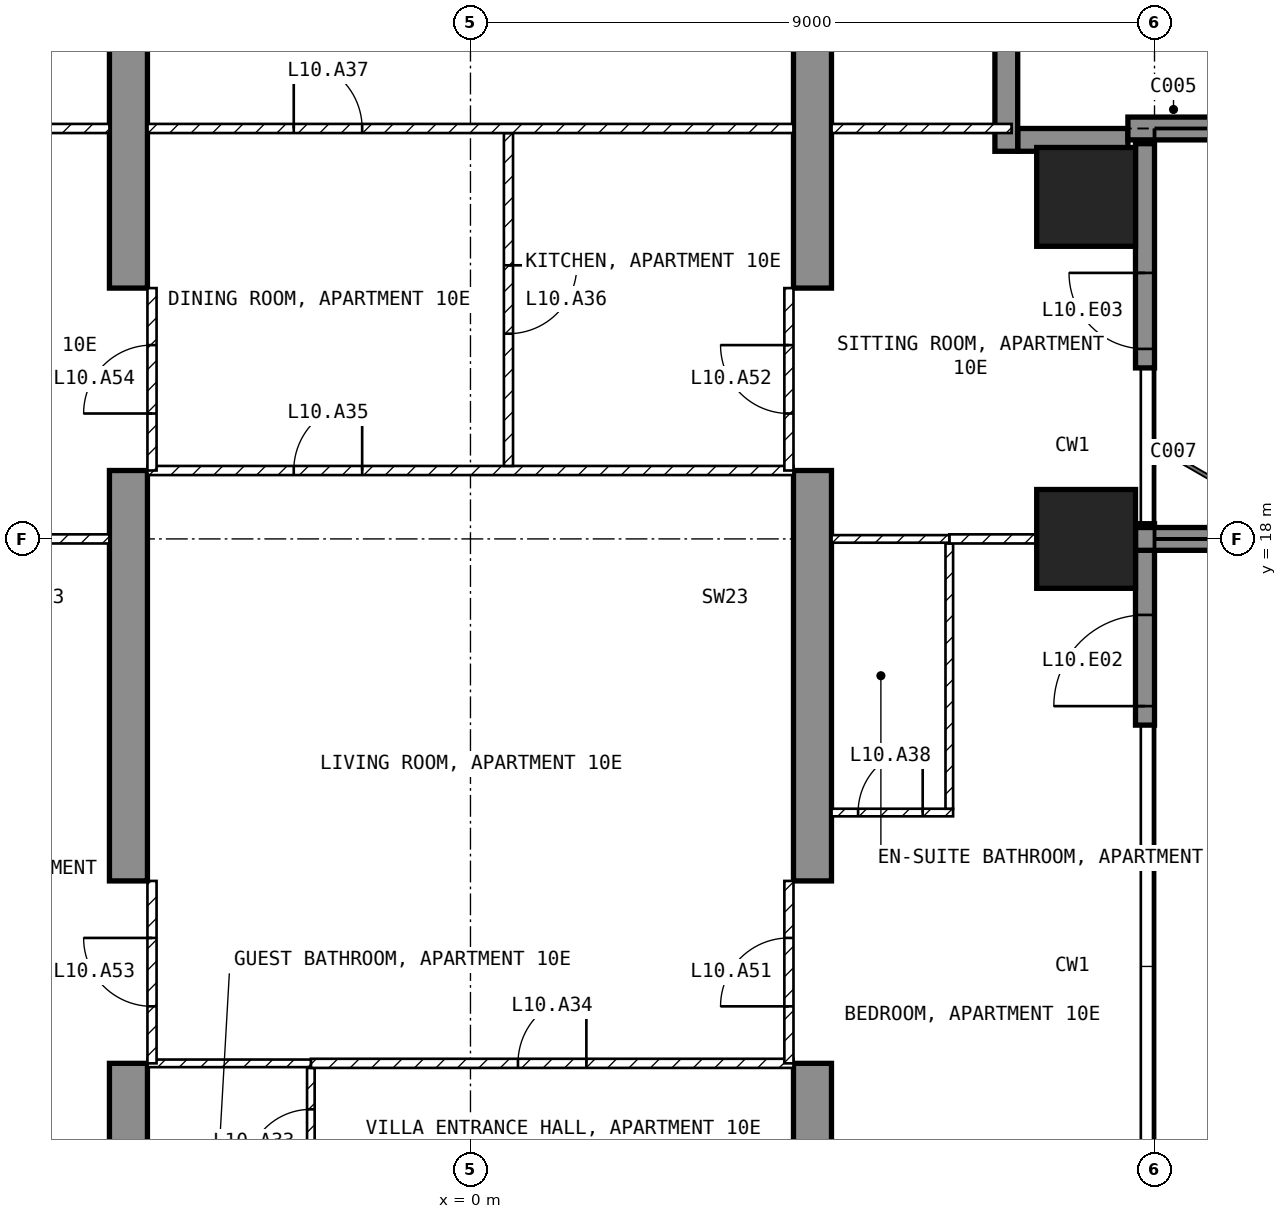
"""IFC4 building model, lengths in metres.
Left out: names, types, materials, properties, quantities, classifications, styles, units other than length and angle.
Written with IfcOpenShell. Run it as: python <this file> out.ifc"""

import sys

from ifc_helpers import new_model, si_unit, direction, frame, frame_2d, origin, origin_2d, place, context, subcontext, project, spatial, polyline, rectangle, outline, extrude, element, fill, save


model = new_model("IFC4")
c1 = context("Model", 3, precision=1e-05, world=origin(), true_north=direction((0.0, 1.0)))
c2 = subcontext(c1, "Body", "Model", "MODEL_VIEW")
j1 = project(units=[si_unit("LENGTHUNIT", "METRE"), si_unit("PLANEANGLEUNIT", "RADIAN")], contexts=[c1])
p1 = place(None, origin())
s1 = spatial("IfcSite", under=j1, at=p1, CompositionType="ELEMENT")
p2 = place(p1, origin())
s2 = spatial("IfcBuilding", under=s1, at=p2, CompositionType="ELEMENT")
p3 = place(p2, frame((0.0, 0.0, 54.0)))
s3 = spatial("IfcBuildingStorey", under=s2, at=p3, CompositionType="ELEMENT", Elevation=54.0)
for number, where, z_axis, x_axis in (
    (1, (8.1, 18.0, -0.25), (0.0, 0.0, 1.0), (1.0, 0.0, 0.0)),
    (2, (8.1, 22.5, -0.25), (0.0, 0.0, 1.0), (1.0, 0.0, 0.0)),
):
    element("IfcColumn", number, at=place(p3, frame(where, z_axis=z_axis, x_axis=x_axis)), inside=s3, PredefinedType="COLUMN", context=c2, shape_type="SweptSolid", body=[
        extrude(rectangle(XDim=1.3, YDim=1.3, at=origin_2d()), origin(), (0.0, 0.0, 1.0), 3.5),
    ])
for number, where, z_axis, x_axis in (
    (3, (-4.75, 9.0, -0.25), (1.0, 0.0, 0.0), (0.0, 1.0, 0.0)),
    (4, (4.25, 9.0, -0.25), (1.0, 0.0, 0.0), (0.0, 1.0, 0.0)),
):
    element("IfcWall", number, at=place(p3, frame(where, z_axis=z_axis, x_axis=x_axis)), inside=s3, PredefinedType="SHEAR", context=c2, shape_type="SweptSolid", body=[
        extrude(outline(polyline([(0.0, 0.0), (2.1, 0.0), (2.1, 2.65), (4.5, 2.65), (4.5, 0.0), (9.9, 0.0), (9.9, 2.65), (12.3, 2.65), (12.3, 0.0), (16.45, 0.0), (16.45, 3.5), (0.0, 3.5), (0.0, 0.0)])), origin(), (0.0, 0.0, 1.0), 0.5),
    ])
p4 = place(p3, frame((8.875, 15.55, 0.0), z_axis=(0.0, 0.0, 1.0), x_axis=(0.0, 1.0, 0.0)))
e5 = element("IfcWall", 5, at=p4, inside=s3, PredefinedType="SOLIDWALL", context=c2, shape_type="SweptSolid", body=[
    extrude(rectangle(XDim=2.65, YDim=0.25, at=frame_2d((1.325, 0.0))), origin(), (0.0, 0.0, 1.0), 3.25),
])
p5 = place(p4, frame((0.25, 0.0, 0.0)))
e6 = element("IfcOpeningElement", 6, at=p5, cuts=e5, PredefinedType="OPENING", context=c2, shape_type="SweptSolid", body=[
    extrude(rectangle(XDim=1.2, YDim=2.4, at=frame_2d((0.6, 1.2))), frame((0.0, 0.135, 0.0), z_axis=(0.0, -1.0, 0.0), x_axis=(1.0, 0.0, 0.0)), (0.0, 0.0, 1.0), 0.27),
])
p6 = place(p3, frame((8.875, 20.25, 0.0), z_axis=(0.0, 0.0, 1.0), x_axis=(0.0, 1.0, 0.0)))
e7 = element("IfcWall", 7, at=p6, inside=s3, PredefinedType="SOLIDWALL", context=c2, shape_type="SweptSolid", body=[
    extrude(rectangle(XDim=2.95, YDim=0.25, at=frame_2d((1.475, 0.0))), origin(), (0.0, 0.0, 1.0), 3.25),
])
p7 = place(p6, frame((0.25, 0.0, 0.0)))
e8 = element("IfcOpeningElement", 8, at=p7, cuts=e7, PredefinedType="OPENING", context=c2, shape_type="SweptSolid", body=[
    extrude(rectangle(XDim=1.0, YDim=2.4, at=frame_2d((0.5, 1.2))), frame((0.0, 0.135, 0.0), z_axis=(0.0, -1.0, 0.0), x_axis=(1.0, 0.0, 0.0)), (0.0, 0.0, 1.0), 0.27),
])
p8 = place(p3, frame((8.65, 23.25, 0.0), z_axis=(0.0, 0.0, 1.0), x_axis=(-1.0, 0.0, 0.0)))
e9 = element("IfcWall", 9, at=p8, inside=s3, PredefinedType="SOLIDWALL", context=c2, shape_type="SweptSolid", body=[
    extrude(rectangle(XDim=1.45, YDim=0.3, at=frame_2d((0.725, 0.0))), origin(), (0.0, 0.0, 1.0), 3.25),
])
p9 = place(p3, frame((7.05, 23.1, 0.0), z_axis=(0.0, 0.0, 1.0), x_axis=(0.0, 1.0, 0.0)))
e10 = element("IfcWall", 10, at=p9, inside=s3, PredefinedType="SOLIDWALL", context=c2, shape_type="SweptSolid", body=[
    extrude(rectangle(XDim=1.8, YDim=0.3, at=frame_2d((0.9, 0.0))), origin(), (0.0, 0.0, 1.0), 3.25),
])
p10 = place(p3, frame((8.75, 18.0, 0.0), z_axis=(0.0, 0.0, 1.0), x_axis=(1.0, 0.0, 0.0)))
e11 = element("IfcWall", 11, at=p10, inside=s3, PredefinedType="SOLIDWALL", context=c2, shape_type="SweptSolid", body=[
    extrude(rectangle(XDim=2.95, YDim=0.3, at=frame_2d((1.475, 0.0))), origin(), (0.0, 0.0, 1.0), 3.25),
])
p11 = place(p3, frame((8.65, 23.4, 0.0), z_axis=(0.0, 0.0, 1.0), x_axis=(1.0, 0.0, 0.0)))
e12 = element("IfcWall", 12, at=p11, inside=s3, PredefinedType="SOLIDWALL", context=c2, shape_type="SweptSolid", body=[
    extrude(rectangle(XDim=3.05, YDim=0.3, at=frame_2d((1.525, 0.0))), origin(), (0.0, 0.0, 1.0), 3.25),
])
p12 = place(p3, frame((-2.1, 9.1, 0.0), z_axis=(0.0, 0.0, 1.0), x_axis=(0.0, 1.0, 0.0)))
e13 = element("IfcWall", 13, at=p12, inside=s3, PredefinedType="PARTITIONING", context=c2, shape_type="SweptSolid", body=[
    extrude(rectangle(XDim=1.94, YDim=0.1, at=frame_2d((0.97, 0.0))), origin(), (0.0, 0.0, 1.0), 3.25),
])
p13 = place(p12, frame((0.545, 0.0, 0.0)))
e14 = element("IfcOpeningElement", 14, at=p13, cuts=e13, PredefinedType="OPENING", context=c2, shape_type="SweptSolid", body=[
    extrude(rectangle(XDim=0.85, YDim=2.1, at=frame_2d((0.425, 1.05))), frame((0.0, 0.06, 0.0), z_axis=(0.0, -1.0, 0.0), x_axis=(1.0, 0.0, 0.0)), (0.0, 0.0, 1.0), 0.12),
])
p14 = place(p3, frame((-2.1, 11.1, 0.0), z_axis=(0.0, 0.0, 1.0), x_axis=(1.0, 0.0, 0.0)))
e15 = element("IfcWall", 15, at=p14, inside=s3, PredefinedType="PARTITIONING", context=c2, shape_type="SweptSolid", body=[
    extrude(rectangle(XDim=6.35, YDim=0.12, at=frame_2d((3.175, 0.0))), origin(), (0.0, 0.0, 1.0), 3.25),
])
p15 = place(p14, frame((2.725, 0.0, 0.0)))
e16 = element("IfcOpeningElement", 16, at=p15, cuts=e15, PredefinedType="OPENING", context=c2, shape_type="SweptSolid", body=[
    extrude(rectangle(XDim=0.9, YDim=2.1, at=frame_2d((0.45, 1.05))), frame((0.0, 0.07, 0.0), z_axis=(0.0, -1.0, 0.0), x_axis=(1.0, 0.0, 0.0)), (0.0, 0.0, 1.0), 0.14),
])
p16 = place(p3, frame((-4.25, 11.1, 0.0), z_axis=(0.0, 0.0, 1.0), x_axis=(1.0, 0.0, 0.0)))
e17 = element("IfcWall", 17, at=p16, inside=s3, PredefinedType="PARTITIONING", context=c2, shape_type="SweptSolid", body=[
    extrude(rectangle(XDim=2.15, YDim=0.1, at=frame_2d((1.075, 0.0))), origin(), (0.0, 0.0, 1.0), 3.25),
])
p17 = place(p3, frame((-4.25, 18.9, 0.0), z_axis=(0.0, 0.0, 1.0), x_axis=(1.0, 0.0, 0.0)))
e18 = element("IfcWall", 18, at=p17, inside=s3, PredefinedType="PARTITIONING", context=c2, shape_type="SweptSolid", body=[
    extrude(rectangle(XDim=8.5, YDim=0.12, at=frame_2d((4.25, 0.0))), origin(), (0.0, 0.0, 1.0), 3.25),
])
p18 = place(p17, frame((1.925, 0.0, 0.0)))
e19 = element("IfcOpeningElement", 19, at=p18, cuts=e18, PredefinedType="OPENING", context=c2, shape_type="SweptSolid", body=[
    extrude(rectangle(XDim=0.9, YDim=2.1, at=frame_2d((0.45, 1.05))), frame((0.0, 0.07, 0.0), z_axis=(0.0, -1.0, 0.0), x_axis=(1.0, 0.0, 0.0)), (0.0, 0.0, 1.0), 0.14),
])
p19 = place(p3, frame((0.5, 23.34, 0.0), z_axis=(0.0, 0.0, 1.0), x_axis=(0.0, -1.0, 0.0)))
e20 = element("IfcWall", 20, at=p19, inside=s3, PredefinedType="PARTITIONING", context=c2, shape_type="SweptSolid", body=[
    extrude(rectangle(XDim=4.38, YDim=0.12, at=frame_2d((2.19, 0.0))), origin(), (0.0, 0.0, 1.0), 3.25),
])
p20 = place(p19, frame((1.74, 0.0, 0.0)))
e21 = element("IfcOpeningElement", 21, at=p20, cuts=e20, PredefinedType="OPENING", context=c2, shape_type="SweptSolid", body=[
    extrude(rectangle(XDim=0.9, YDim=2.1, at=frame_2d((0.45, 1.05))), frame((0.0, 0.07, 0.0), z_axis=(0.0, -1.0, 0.0), x_axis=(1.0, 0.0, 0.0)), (0.0, 0.0, 1.0), 0.14),
])
p21 = place(p3, frame((-4.25, 23.4, 0.0), z_axis=(0.0, 0.0, 1.0), x_axis=(1.0, 0.0, 0.0)))
e22 = element("IfcWall", 22, at=p21, inside=s3, PredefinedType="PARTITIONING", context=c2, shape_type="SweptSolid", body=[
    extrude(rectangle(XDim=8.5, YDim=0.12, at=frame_2d((4.25, 0.0))), origin(), (0.0, 0.0, 1.0), 3.25),
])
p22 = place(p21, frame((1.925, 0.0, 0.0)))
e23 = element("IfcOpeningElement", 23, at=p22, cuts=e22, PredefinedType="OPENING", context=c2, shape_type="SweptSolid", body=[
    extrude(rectangle(XDim=0.9, YDim=2.1, at=frame_2d((0.45, 1.05))), frame((0.0, 0.07, 0.0), z_axis=(0.0, -1.0, 0.0), x_axis=(1.0, 0.0, 0.0)), (0.0, 0.0, 1.0), 0.14),
])
p23 = place(p3, frame((4.75, 14.4, 0.0), z_axis=(0.0, 0.0, 1.0), x_axis=(1.0, 0.0, 0.0)))
e24 = element("IfcWall", 24, at=p23, inside=s3, PredefinedType="PARTITIONING", context=c2, shape_type="SweptSolid", body=[
    extrude(rectangle(XDim=1.6, YDim=0.1, at=frame_2d((0.8, 0.0))), origin(), (0.0, 0.0, 1.0), 3.25),
])
p24 = place(p23, frame((0.35, 0.0, 0.0)))
e25 = element("IfcOpeningElement", 25, at=p24, cuts=e24, PredefinedType="OPENING", context=c2, shape_type="SweptSolid", body=[
    extrude(rectangle(XDim=0.85, YDim=2.1, at=frame_2d((0.425, 1.05))), frame((0.0, 0.06, 0.0), z_axis=(0.0, -1.0, 0.0), x_axis=(1.0, 0.0, 0.0)), (0.0, 0.0, 1.0), 0.12),
])
p25 = place(p3, frame((6.3, 14.45, 0.0), z_axis=(0.0, 0.0, 1.0), x_axis=(0.0, 1.0, 0.0)))
e26 = element("IfcWall", 26, at=p25, inside=s3, PredefinedType="PARTITIONING", context=c2, shape_type="SweptSolid", body=[
    extrude(rectangle(XDim=3.49, YDim=0.1, at=frame_2d((1.745, 0.0))), origin(), (0.0, 0.0, 1.0), 3.25),
])
p26 = place(p3, frame((6.3, 18.0, 0.0), z_axis=(0.0, 0.0, 1.0), x_axis=(1.0, 0.0, 0.0)))
e27 = element("IfcWall", 27, at=p26, inside=s3, PredefinedType="PARTITIONING", context=c2, shape_type="SweptSolid", body=[
    extrude(rectangle(XDim=1.15, YDim=0.12, at=frame_2d((0.575, 0.0))), origin(), (0.0, 0.0, 1.0), 2.346),
])
p27 = place(p3, frame((4.75, 18.0, 0.0), z_axis=(0.0, 0.0, 1.0), x_axis=(1.0, 0.0, 0.0)))
e28 = element("IfcWall", 28, at=p27, inside=s3, PredefinedType="PARTITIONING", context=c2, shape_type="SweptSolid", body=[
    extrude(rectangle(XDim=1.55, YDim=0.1, at=frame_2d((0.775, 0.0))), origin(), (0.0, 0.0, 1.0), 2.346),
])
p28 = place(p3, frame((4.75, 23.4, 0.0), z_axis=(0.0, 0.0, 1.0), x_axis=(1.0, 0.0, 0.0)))
e29 = element("IfcWall", 29, at=p28, inside=s3, PredefinedType="PARTITIONING", context=c2, shape_type="SweptSolid", body=[
    extrude(rectangle(XDim=2.37, YDim=0.12, at=frame_2d((1.185, 0.0))), origin(), (0.0, 0.0, 1.0), 3.25),
])
p29 = place(p3, frame((-7.45, 18.0, 0.0), z_axis=(0.0, 0.0, 1.0), x_axis=(1.0, 0.0, 0.0)))
e30 = element("IfcWall", 30, at=p29, inside=s3, PredefinedType="PARTITIONING", context=c2, shape_type="SweptSolid", body=[
    extrude(rectangle(XDim=2.7, YDim=0.12, at=frame_2d((1.35, 0.0))), origin(), (0.0, 0.0, 1.0), 2.346),
])
p30 = place(p3, frame((-7.12, 23.4, 0.0), z_axis=(0.0, 0.0, 1.0), x_axis=(1.0, 0.0, 0.0)))
e31 = element("IfcWall", 31, at=p30, inside=s3, PredefinedType="PARTITIONING", context=c2, shape_type="SweptSolid", body=[
    extrude(rectangle(XDim=2.37, YDim=0.12, at=frame_2d((1.185, 0.0))), origin(), (0.0, 0.0, 1.0), 3.25),
])
p31 = place(p3, frame((4.19, 11.1, 0.0), z_axis=(0.0, 0.0, 1.0), x_axis=(0.0, 1.0, 0.0)))
e32 = element("IfcWall", 32, at=p31, inside=s3, PredefinedType="PARTITIONING", context=c2, shape_type="SweptSolid", body=[
    extrude(rectangle(XDim=2.4, YDim=0.12, at=frame_2d((1.2, 0.0))), origin(), (0.0, 0.0, 1.0), 2.4),
])
p32 = place(p31, frame((0.75, 0.0, 0.0)))
e33 = element("IfcOpeningElement", 33, at=p32, cuts=e32, PredefinedType="OPENING", context=c2, shape_type="SweptSolid", body=[
    extrude(rectangle(XDim=0.9, YDim=2.1, at=frame_2d((0.45, 1.05))), frame((0.0, 0.07, 0.0), z_axis=(0.0, -1.0, 0.0), x_axis=(1.0, 0.0, 0.0)), (0.0, 0.0, 1.0), 0.14),
])
p33 = place(p3, frame((4.19, 18.9, 0.0), z_axis=(0.0, 0.0, 1.0), x_axis=(0.0, 1.0, 0.0)))
e34 = element("IfcWall", 34, at=p33, inside=s3, PredefinedType="PARTITIONING", context=c2, shape_type="SweptSolid", body=[
    extrude(rectangle(XDim=2.4, YDim=0.12, at=frame_2d((1.2, 0.0))), origin(), (0.0, 0.0, 1.0), 2.4),
])
p34 = place(p33, frame((0.75, 0.0, 0.0)))
e35 = element("IfcOpeningElement", 35, at=p34, cuts=e34, PredefinedType="OPENING", context=c2, shape_type="SweptSolid", body=[
    extrude(rectangle(XDim=0.9, YDim=2.1, at=frame_2d((0.45, 1.05))), frame((0.0, 0.07, 0.0), z_axis=(0.0, -1.0, 0.0), x_axis=(1.0, 0.0, 0.0)), (0.0, 0.0, 1.0), 0.14),
])
p35 = place(p3, frame((-4.19, 11.1, 0.0), z_axis=(0.0, 0.0, 1.0), x_axis=(0.0, 1.0, 0.0)))
e36 = element("IfcWall", 36, at=p35, inside=s3, PredefinedType="PARTITIONING", context=c2, shape_type="SweptSolid", body=[
    extrude(rectangle(XDim=2.4, YDim=0.12, at=frame_2d((1.2, 0.0))), origin(), (0.0, 0.0, 1.0), 2.4),
])
p36 = place(p35, frame((0.75, 0.0, 0.0)))
e37 = element("IfcOpeningElement", 37, at=p36, cuts=e36, PredefinedType="OPENING", context=c2, shape_type="SweptSolid", body=[
    extrude(rectangle(XDim=0.9, YDim=2.1, at=frame_2d((0.45, 1.05))), frame((0.0, 0.07, 0.0), z_axis=(0.0, -1.0, 0.0), x_axis=(1.0, 0.0, 0.0)), (0.0, 0.0, 1.0), 0.14),
])
p37 = place(p3, frame((-4.19, 18.9, 0.0), z_axis=(0.0, 0.0, 1.0), x_axis=(0.0, 1.0, 0.0)))
e38 = element("IfcWall", 38, at=p37, inside=s3, PredefinedType="PARTITIONING", context=c2, shape_type="SweptSolid", body=[
    extrude(rectangle(XDim=2.4, YDim=0.12, at=frame_2d((1.2, 0.0))), origin(), (0.0, 0.0, 1.0), 2.4),
])
p38 = place(p37, frame((0.75, 0.0, 0.0)))
e39 = element("IfcOpeningElement", 39, at=p38, cuts=e38, PredefinedType="OPENING", context=c2, shape_type="SweptSolid", body=[
    extrude(rectangle(XDim=0.9, YDim=2.1, at=frame_2d((0.45, 1.05))), frame((0.0, 0.07, 0.0), z_axis=(0.0, -1.0, 0.0), x_axis=(1.0, 0.0, 0.0)), (0.0, 0.0, 1.0), 0.14),
])
p39 = place(p5, origin())
e40 = element("IfcDoor", 40, at=p39, inside=s3, OperationType="SINGLE_SWING_LEFT", PredefinedType="DOOR", context=c2, shape_type="SweptSolid", body=[
    extrude(rectangle(XDim=1.2, YDim=2.4, at=frame_2d((0.6, 1.2))), frame((0.0, 0.025, 0.0), z_axis=(0.0, -1.0, 0.0), x_axis=(1.0, 0.0, 0.0)), (0.0, 0.0, 1.0), 0.05),
])
fill(e6, e40)
p40 = place(p7, origin())
e41 = element("IfcDoor", 41, at=p40, inside=s3, OperationType="SINGLE_SWING_RIGHT", PredefinedType="DOOR", context=c2, shape_type="SweptSolid", body=[
    extrude(rectangle(XDim=1.0, YDim=2.4, at=frame_2d((0.5, 1.2))), frame((0.0, 0.025, 0.0), z_axis=(0.0, -1.0, 0.0), x_axis=(1.0, 0.0, 0.0)), (0.0, 0.0, 1.0), 0.05),
])
fill(e8, e41)
p41 = place(p13, origin())
e42 = element("IfcDoor", 42, at=p41, inside=s3, OperationType="SINGLE_SWING_LEFT", PredefinedType="DOOR", context=c2, shape_type="SweptSolid", body=[
    extrude(rectangle(XDim=0.85, YDim=2.1, at=frame_2d((0.425, 1.05))), frame((0.0, 0.025, 0.0), z_axis=(0.0, -1.0, 0.0), x_axis=(1.0, 0.0, 0.0)), (0.0, 0.0, 1.0), 0.05),
])
fill(e14, e42)
p42 = place(p15, origin())
e43 = element("IfcDoor", 43, at=p42, inside=s3, OperationType="SINGLE_SWING_RIGHT", PredefinedType="DOOR", context=c2, shape_type="SweptSolid", body=[
    extrude(rectangle(XDim=0.9, YDim=2.1, at=frame_2d((0.45, 1.05))), frame((0.0, 0.025, 0.0), z_axis=(0.0, -1.0, 0.0), x_axis=(1.0, 0.0, 0.0)), (0.0, 0.0, 1.0), 0.05),
])
fill(e16, e43)
p43 = place(p18, origin())
e44 = element("IfcDoor", 44, at=p43, inside=s3, OperationType="SINGLE_SWING_RIGHT", PredefinedType="DOOR", context=c2, shape_type="SweptSolid", body=[
    extrude(rectangle(XDim=0.9, YDim=2.1, at=frame_2d((0.45, 1.05))), frame((0.0, 0.025, 0.0), z_axis=(0.0, -1.0, 0.0), x_axis=(1.0, 0.0, 0.0)), (0.0, 0.0, 1.0), 0.05),
])
fill(e19, e44)
p44 = place(p20, origin())
e45 = element("IfcDoor", 45, at=p44, inside=s3, OperationType="SINGLE_SWING_LEFT", PredefinedType="DOOR", context=c2, shape_type="SweptSolid", body=[
    extrude(rectangle(XDim=0.9, YDim=2.1, at=frame_2d((0.45, 1.05))), frame((0.0, 0.025, 0.0), z_axis=(0.0, -1.0, 0.0), x_axis=(1.0, 0.0, 0.0)), (0.0, 0.0, 1.0), 0.05),
])
fill(e21, e45)
p45 = place(p22, origin())
e46 = element("IfcDoor", 46, at=p45, inside=s3, OperationType="SINGLE_SWING_LEFT", PredefinedType="DOOR", context=c2, shape_type="SweptSolid", body=[
    extrude(rectangle(XDim=0.9, YDim=2.1, at=frame_2d((0.45, 1.05))), frame((0.0, 0.025, 0.0), z_axis=(0.0, -1.0, 0.0), x_axis=(1.0, 0.0, 0.0)), (0.0, 0.0, 1.0), 0.05),
])
fill(e23, e46)
p46 = place(p24, origin())
e47 = element("IfcDoor", 47, at=p46, inside=s3, OperationType="SINGLE_SWING_RIGHT", PredefinedType="DOOR", context=c2, shape_type="SweptSolid", body=[
    extrude(rectangle(XDim=0.85, YDim=2.1, at=frame_2d((0.425, 1.05))), frame((0.0, 0.025, 0.0), z_axis=(0.0, -1.0, 0.0), x_axis=(1.0, 0.0, 0.0)), (0.0, 0.0, 1.0), 0.05),
])
fill(e25, e47)
p47 = place(p32, origin())
e48 = element("IfcDoor", 48, at=p47, inside=s3, OperationType="SINGLE_SWING_LEFT", PredefinedType="DOOR", context=c2, shape_type="SweptSolid", body=[
    extrude(rectangle(XDim=0.9, YDim=2.1, at=frame_2d((0.45, 1.05))), frame((0.0, 0.025, 0.0), z_axis=(0.0, -1.0, 0.0), x_axis=(1.0, 0.0, 0.0)), (0.0, 0.0, 1.0), 0.05),
])
fill(e33, e48)
p48 = place(p34, origin())
e49 = element("IfcDoor", 49, at=p48, inside=s3, OperationType="SINGLE_SWING_RIGHT", PredefinedType="DOOR", context=c2, shape_type="SweptSolid", body=[
    extrude(rectangle(XDim=0.9, YDim=2.1, at=frame_2d((0.45, 1.05))), frame((0.0, 0.025, 0.0), z_axis=(0.0, -1.0, 0.0), x_axis=(1.0, 0.0, 0.0)), (0.0, 0.0, 1.0), 0.05),
])
fill(e35, e49)
p49 = place(p36, origin())
e50 = element("IfcDoor", 50, at=p49, inside=s3, OperationType="SINGLE_SWING_RIGHT", PredefinedType="DOOR", context=c2, shape_type="SweptSolid", body=[
    extrude(rectangle(XDim=0.9, YDim=2.1, at=frame_2d((0.45, 1.05))), frame((0.0, 0.025, 0.0), z_axis=(0.0, -1.0, 0.0), x_axis=(1.0, 0.0, 0.0)), (0.0, 0.0, 1.0), 0.05),
])
fill(e37, e50)
p50 = place(p38, origin())
e51 = element("IfcDoor", 51, at=p50, inside=s3, OperationType="SINGLE_SWING_LEFT", PredefinedType="DOOR", context=c2, shape_type="SweptSolid", body=[
    extrude(rectangle(XDim=0.9, YDim=2.1, at=frame_2d((0.45, 1.05))), frame((0.0, 0.025, 0.0), z_axis=(0.0, -1.0, 0.0), x_axis=(1.0, 0.0, 0.0)), (0.0, 0.0, 1.0), 0.05),
])
fill(e39, e51)
save(model, sys.argv[1])
